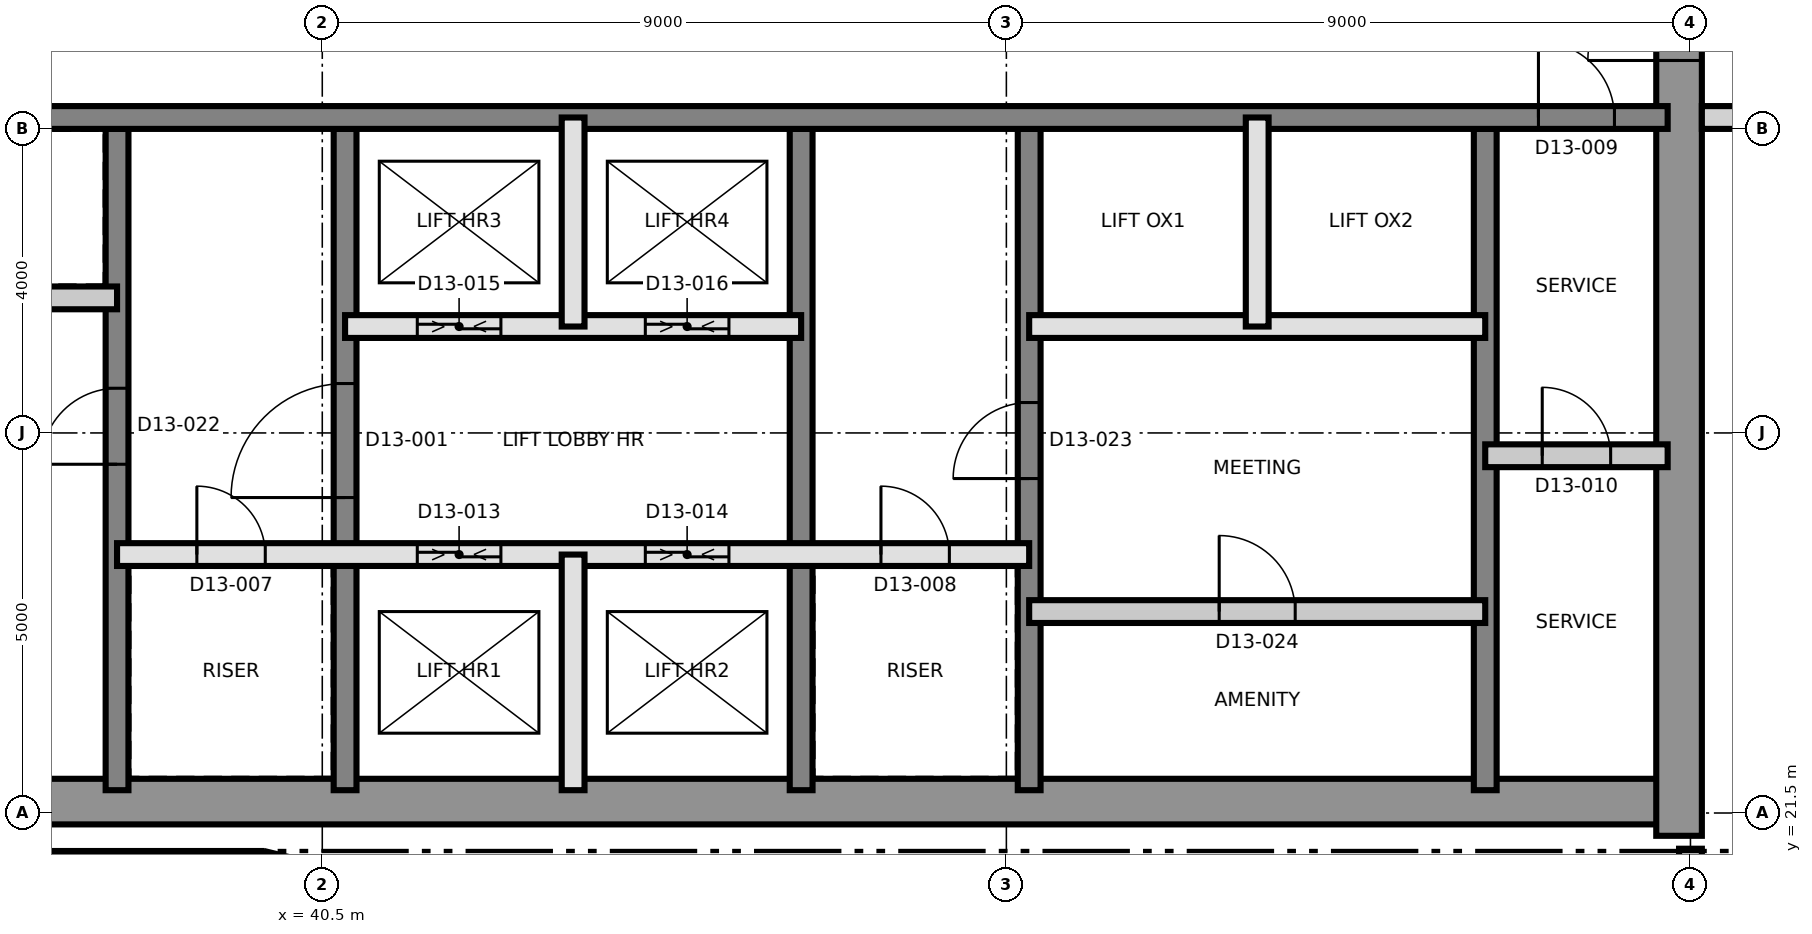
"""IFC4 building model, lengths in metres.
Left out: names, types, materials, properties, quantities, classifications, styles, units other than length and angle.
Written with IfcOpenShell. Run it as: python <this file> out.ifc"""

import sys

from ifc_helpers import new_model, si_unit, direction, frame, frame_2d, origin, place, context, subcontext, project, spatial, rectangle, extrude, element, fill, save


model = new_model("IFC4")
c1 = context("Model", 3, precision=1e-05, world=origin(), true_north=direction((0.0, 1.0)))
c2 = subcontext(c1, "Body", "Model", "MODEL_VIEW")
j1 = project(units=[si_unit("LENGTHUNIT", "METRE"), si_unit("PLANEANGLEUNIT", "RADIAN")], contexts=[c1])
p1 = place(None, origin())
s1 = spatial("IfcSite", under=j1, at=p1, CompositionType="ELEMENT")
p2 = place(p1, origin())
s2 = spatial("IfcBuilding", under=s1, at=p2, CompositionType="ELEMENT")
p3 = place(p2, frame((0.0, 0.0, 145.9)))
s3 = spatial("IfcBuildingStorey", under=s2, at=p3, CompositionType="ELEMENT", Elevation=145.9)
p4 = place(p3, frame((31.2, 21.65, 0.0), z_axis=(0.0, 0.0, 1.0), x_axis=(1.0, 0.0, 0.0)))
e1 = element("IfcWall", 1, at=p4, inside=s3, PredefinedType="SHEAR", context=c2, shape_type="SweptSolid", body=[
    extrude(rectangle(XDim=27.0, YDim=0.6, at=frame_2d((13.5, 0.0))), origin(), (0.0, 0.0, 1.0), 3.7),
])
p5 = place(p3, frame((58.35, 21.2, 0.0), z_axis=(0.0, 0.0, 1.0), x_axis=(0.0, 1.0, 0.0)))
e2 = element("IfcWall", 2, at=p5, inside=s3, PredefinedType="SHEAR", context=c2, shape_type="SweptSolid", body=[
    extrude(rectangle(XDim=18.6, YDim=0.6, at=frame_2d((9.3, 0.0))), origin(), (0.0, 0.0, 1.0), 3.7),
])
p6 = place(p5, frame((10.2, 0.0, 0.0)))
e3 = element("IfcOpeningElement", 3, at=p6, cuts=e2, PredefinedType="OPENING", context=c2, shape_type="SweptSolid", body=[
    extrude(rectangle(XDim=1.2, YDim=2.1, at=frame_2d((0.6, 1.05))), frame((0.0, 0.31, 0.0), z_axis=(0.0, -1.0, 0.0), x_axis=(1.0, 0.0, 0.0)), (0.0, 0.0, 1.0), 0.62),
])
p7 = place(p3, frame((37.8, 21.8, 0.0), z_axis=(0.0, 0.0, 1.0), x_axis=(0.0, 1.0, 0.0)))
e4 = element("IfcWall", 4, at=p7, inside=s3, PredefinedType="SHEAR", context=c2, shape_type="SweptSolid", body=[
    extrude(rectangle(XDim=8.7, YDim=0.3, at=frame_2d((4.35, 0.0))), origin(), (0.0, 0.0, 1.0), 3.7),
])
p8 = place(p7, frame((4.288, 0.0, 0.0)))
e5 = element("IfcOpeningElement", 5, at=p8, cuts=e4, PredefinedType="OPENING", context=c2, shape_type="SweptSolid", body=[
    extrude(rectangle(XDim=1.0, YDim=2.1, at=frame_2d((0.5, 1.05))), frame((0.0, 0.16, 0.0), z_axis=(0.0, -1.0, 0.0), x_axis=(1.0, 0.0, 0.0)), (0.0, 0.0, 1.0), 0.32),
])
p9 = place(p3, frame((40.8, 21.8, 0.0), z_axis=(0.0, 0.0, 1.0), x_axis=(0.0, 1.0, 0.0)))
e6 = element("IfcWall", 6, at=p9, inside=s3, PredefinedType="SHEAR", context=c2, shape_type="SweptSolid", body=[
    extrude(rectangle(XDim=8.7, YDim=0.3, at=frame_2d((4.35, 0.0))), origin(), (0.0, 0.0, 1.0), 3.7),
])
p10 = place(p9, frame((3.85, 0.0, 0.0)))
e7 = element("IfcOpeningElement", 7, at=p10, cuts=e6, PredefinedType="OPENING", context=c2, shape_type="SweptSolid", body=[
    extrude(rectangle(XDim=1.5, YDim=2.1, at=frame_2d((0.75, 1.05))), frame((0.0, 0.16, 0.0), z_axis=(0.0, -1.0, 0.0), x_axis=(1.0, 0.0, 0.0)), (0.0, 0.0, 1.0), 0.32),
])
p11 = place(p3, frame((46.8, 21.8, 0.0), z_axis=(0.0, 0.0, 1.0), x_axis=(0.0, 1.0, 0.0)))
e8 = element("IfcWall", 8, at=p11, inside=s3, PredefinedType="SHEAR", context=c2, shape_type="SweptSolid", body=[
    extrude(rectangle(XDim=8.7, YDim=0.3, at=frame_2d((4.35, 0.0))), origin(), (0.0, 0.0, 1.0), 3.7),
])
p12 = place(p3, frame((49.8, 21.8, 0.0), z_axis=(0.0, 0.0, 1.0), x_axis=(0.0, 1.0, 0.0)))
e9 = element("IfcWall", 9, at=p12, inside=s3, PredefinedType="SHEAR", context=c2, shape_type="SweptSolid", body=[
    extrude(rectangle(XDim=8.7, YDim=0.3, at=frame_2d((4.35, 0.0))), origin(), (0.0, 0.0, 1.0), 3.7),
])
p13 = place(p12, frame((4.1, 0.0, 0.0)))
e10 = element("IfcOpeningElement", 10, at=p13, cuts=e9, PredefinedType="OPENING", context=c2, shape_type="SweptSolid", body=[
    extrude(rectangle(XDim=1.0, YDim=2.1, at=frame_2d((0.5, 1.05))), frame((0.0, 0.16, 0.0), z_axis=(0.0, -1.0, 0.0), x_axis=(1.0, 0.0, 0.0)), (0.0, 0.0, 1.0), 0.32),
])
p14 = place(p3, frame((55.8, 21.8, 0.0), z_axis=(0.0, 0.0, 1.0), x_axis=(0.0, 1.0, 0.0)))
e11 = element("IfcWall", 11, at=p14, inside=s3, PredefinedType="SHEAR", context=c2, shape_type="SweptSolid", body=[
    extrude(rectangle(XDim=8.7, YDim=0.3, at=frame_2d((4.35, 0.0))), origin(), (0.0, 0.0, 1.0), 3.7),
])
p15 = place(p3, frame((31.8, 30.65, 0.0), z_axis=(0.0, 0.0, 1.0), x_axis=(1.0, 0.0, 0.0)))
e12 = element("IfcWall", 12, at=p15, inside=s3, PredefinedType="SHEAR", context=c2, shape_type="SweptSolid", body=[
    extrude(rectangle(XDim=26.4, YDim=0.3, at=frame_2d((13.2, 0.0))), origin(), (0.0, 0.0, 1.0), 3.7),
])
p16 = place(p15, frame((24.7, 0.0, 0.0)))
e13 = element("IfcOpeningElement", 13, at=p16, cuts=e12, PredefinedType="OPENING", context=c2, shape_type="SweptSolid", body=[
    extrude(rectangle(XDim=1.0, YDim=2.1, at=frame_2d((0.5, 1.05))), frame((0.0, 0.16, 0.0), z_axis=(0.0, -1.0, 0.0), x_axis=(1.0, 0.0, 0.0)), (0.0, 0.0, 1.0), 0.32),
])
p17 = place(p15, frame((4.0, 0.0, 0.0)))
e14 = element("IfcOpeningElement", 14, at=p17, cuts=e12, PredefinedType="OPENING", context=c2, shape_type="SweptSolid", body=[
    extrude(rectangle(XDim=1.0, YDim=2.1, at=frame_2d((0.5, 1.05))), frame((0.0, 0.16, 0.0), z_axis=(0.0, -1.0, 0.0), x_axis=(1.0, 0.0, 0.0)), (0.0, 0.0, 1.0), 0.32),
])
p18 = place(p3, frame((31.36, 20.85, 0.0), z_axis=(0.0, 0.0, 1.0), x_axis=(1.0, 0.0, 0.0)))
e15 = element("IfcWall", 15, at=p18, inside=s3, PredefinedType="SOLIDWALL", context=c2, shape_type="SweptSolid", body=[
    extrude(rectangle(XDim=8.34, YDim=0.3, at=frame_2d((4.17, 0.0))), origin(), (0.0, 0.0, 1.0), 3.4),
])
p19 = place(p3, frame((39.735, 20.846, 0.0), z_axis=(0.0, 0.0, 1.0), x_axis=(0.97206095595, -0.234728562212, 0.0)))
e16 = element("IfcWall", 16, at=p19, inside=s3, PredefinedType="SOLIDWALL", context=c2, shape_type="SweptSolid", body=[
    extrude(rectangle(XDim=2.35, YDim=0.3, at=frame_2d((1.175, 0.0))), origin(), (0.0, 0.0, 1.0), 3.4),
])
p20 = place(p3, frame((49.8, 24.15, 0.0), z_axis=(0.0, 0.0, 1.0), x_axis=(1.0, 0.0, 0.0)))
e17 = element("IfcWall", 17, at=p20, inside=s3, PredefinedType="PARTITIONING", context=c2, shape_type="SweptSolid", body=[
    extrude(rectangle(XDim=6.0, YDim=0.3, at=frame_2d((3.0, 0.0))), origin(), (0.0, 0.0, 1.0), 3.4),
])
p21 = place(p20, frame((2.5, 0.0, 0.0)))
e18 = element("IfcOpeningElement", 18, at=p21, cuts=e17, PredefinedType="OPENING", context=c2, shape_type="SweptSolid", body=[
    extrude(rectangle(XDim=1.0, YDim=2.1, at=frame_2d((0.5, 1.05))), frame((0.0, 0.16, 0.0), z_axis=(0.0, -1.0, 0.0), x_axis=(1.0, 0.0, 0.0)), (0.0, 0.0, 1.0), 0.32),
])
p22 = place(p3, frame((37.8, 24.9, 0.0), z_axis=(0.0, 0.0, 1.0), x_axis=(1.0, 0.0, 0.0)))
e19 = element("IfcWall", 19, at=p22, inside=s3, PredefinedType="SOLIDWALL", context=c2, shape_type="SweptSolid", body=[
    extrude(rectangle(XDim=12.0, YDim=0.3, at=frame_2d((6.0, 0.0))), origin(), (0.0, 0.0, 1.0), 3.4),
])
p23 = place(p22, frame((1.05, 0.0, 0.0)))
e20 = element("IfcOpeningElement", 20, at=p23, cuts=e19, PredefinedType="OPENING", context=c2, shape_type="SweptSolid", body=[
    extrude(rectangle(XDim=0.9, YDim=2.1, at=frame_2d((0.45, 1.05))), frame((0.0, 0.16, 0.0), z_axis=(0.0, -1.0, 0.0), x_axis=(1.0, 0.0, 0.0)), (0.0, 0.0, 1.0), 0.32),
])
p24 = place(p22, frame((10.05, 0.0, 0.0)))
e21 = element("IfcOpeningElement", 21, at=p24, cuts=e19, PredefinedType="OPENING", context=c2, shape_type="SweptSolid", body=[
    extrude(rectangle(XDim=0.9, YDim=2.1, at=frame_2d((0.45, 1.05))), frame((0.0, 0.16, 0.0), z_axis=(0.0, -1.0, 0.0), x_axis=(1.0, 0.0, 0.0)), (0.0, 0.0, 1.0), 0.32),
])
p25 = place(p22, frame((3.95, 0.0, 0.0)))
e22 = element("IfcOpeningElement", 22, at=p25, cuts=e19, PredefinedType="OPENING", context=c2, shape_type="SweptSolid", body=[
    extrude(rectangle(XDim=1.1, YDim=2.4, at=frame_2d((0.55, 1.2))), frame((0.0, 0.16, 0.0), z_axis=(0.0, -1.0, 0.0), x_axis=(1.0, 0.0, 0.0)), (0.0, 0.0, 1.0), 0.32),
])
p26 = place(p22, frame((6.95, 0.0, 0.0)))
e23 = element("IfcOpeningElement", 23, at=p26, cuts=e19, PredefinedType="OPENING", context=c2, shape_type="SweptSolid", body=[
    extrude(rectangle(XDim=1.1, YDim=2.4, at=frame_2d((0.55, 1.2))), frame((0.0, 0.16, 0.0), z_axis=(0.0, -1.0, 0.0), x_axis=(1.0, 0.0, 0.0)), (0.0, 0.0, 1.0), 0.32),
])
p27 = place(p3, frame((55.8, 26.2, 0.0), z_axis=(0.0, 0.0, 1.0), x_axis=(1.0, 0.0, 0.0)))
e24 = element("IfcWall", 24, at=p27, inside=s3, PredefinedType="PARTITIONING", context=c2, shape_type="SweptSolid", body=[
    extrude(rectangle(XDim=2.4, YDim=0.3, at=frame_2d((1.2, 0.0))), origin(), (0.0, 0.0, 1.0), 3.4),
])
p28 = place(p27, frame((0.75, 0.0, 0.0)))
e25 = element("IfcOpeningElement", 25, at=p28, cuts=e24, PredefinedType="OPENING", context=c2, shape_type="SweptSolid", body=[
    extrude(rectangle(XDim=0.9, YDim=2.1, at=frame_2d((0.45, 1.05))), frame((0.0, 0.16, 0.0), z_axis=(0.0, -1.0, 0.0), x_axis=(1.0, 0.0, 0.0)), (0.0, 0.0, 1.0), 0.32),
])
p29 = place(p3, frame((40.8, 27.9, 0.0), z_axis=(0.0, 0.0, 1.0), x_axis=(1.0, 0.0, 0.0)))
e26 = element("IfcWall", 26, at=p29, inside=s3, PredefinedType="SOLIDWALL", context=c2, shape_type="SweptSolid", body=[
    extrude(rectangle(XDim=6.0, YDim=0.3, at=frame_2d((3.0, 0.0))), origin(), (0.0, 0.0, 1.0), 3.4),
])
p30 = place(p29, frame((0.95, 0.0, 0.0)))
e27 = element("IfcOpeningElement", 27, at=p30, cuts=e26, PredefinedType="OPENING", context=c2, shape_type="SweptSolid", body=[
    extrude(rectangle(XDim=1.1, YDim=2.4, at=frame_2d((0.55, 1.2))), frame((0.0, 0.16, 0.0), z_axis=(0.0, -1.0, 0.0), x_axis=(1.0, 0.0, 0.0)), (0.0, 0.0, 1.0), 0.32),
])
p31 = place(p29, frame((3.95, 0.0, 0.0)))
e28 = element("IfcOpeningElement", 28, at=p31, cuts=e26, PredefinedType="OPENING", context=c2, shape_type="SweptSolid", body=[
    extrude(rectangle(XDim=1.1, YDim=2.4, at=frame_2d((0.55, 1.2))), frame((0.0, 0.16, 0.0), z_axis=(0.0, -1.0, 0.0), x_axis=(1.0, 0.0, 0.0)), (0.0, 0.0, 1.0), 0.32),
])
p32 = place(p3, frame((49.8, 27.9, 0.0), z_axis=(0.0, 0.0, 1.0), x_axis=(1.0, 0.0, 0.0)))
e29 = element("IfcWall", 29, at=p32, inside=s3, PredefinedType="SOLIDWALL", context=c2, shape_type="SweptSolid", body=[
    extrude(rectangle(XDim=6.0, YDim=0.3, at=frame_2d((3.0, 0.0))), origin(), (0.0, 0.0, 1.0), 3.4),
])
p33 = place(p3, frame((31.8, 28.277, 0.0), z_axis=(0.0, 0.0, 1.0), x_axis=(1.0, 0.0, 0.0)))
e30 = element("IfcWall", 30, at=p33, inside=s3, PredefinedType="PARTITIONING", context=c2, shape_type="SweptSolid", body=[
    extrude(rectangle(XDim=6.0, YDim=0.3, at=frame_2d((3.0, 0.0))), origin(), (0.0, 0.0, 1.0), 3.4),
])
p34 = place(p3, frame((43.8, 21.8, 0.0), z_axis=(0.0, 0.0, 1.0), x_axis=(0.0, 1.0, 0.0)))
e31 = element("IfcWall", 31, at=p34, inside=s3, PredefinedType="SOLIDWALL", context=c2, shape_type="SweptSolid", body=[
    extrude(rectangle(XDim=3.1, YDim=0.3, at=frame_2d((1.55, 0.0))), origin(), (0.0, 0.0, 1.0), 3.4),
])
for number, where, z_axis, x_axis in (
    (32, (43.8, 27.9, 0.0), (0.0, 0.0, 1.0), (0.0, 1.0, 0.0)),
    (33, (52.8, 27.9, 0.0), (0.0, 0.0, 1.0), (0.0, 1.0, 0.0)),
):
    element("IfcWall", number, at=place(p3, frame(where, z_axis=z_axis, x_axis=x_axis)), inside=s3, PredefinedType="SOLIDWALL", context=c2, shape_type="SweptSolid", body=[
        extrude(rectangle(XDim=2.75, YDim=0.3, at=frame_2d((1.375, 0.0))), origin(), (0.0, 0.0, 1.0), 3.4),
    ])
p35 = place(p3, frame((58.65, 30.65, 0.0), z_axis=(0.0, 0.0, 1.0), x_axis=(1.0, 0.0, 0.0)))
e34 = element("IfcWall", 34, at=p35, inside=s3, PredefinedType="PARTITIONING", context=c2, shape_type="SweptSolid", body=[
    extrude(rectangle(XDim=26.68, YDim=0.3, at=frame_2d((13.34, 0.0))), origin(), (0.0, 0.0, 1.0), 3.3),
])
p36 = place(p35, frame((2.2, 0.0, 0.0)))
e35 = element("IfcOpeningElement", 35, at=p36, cuts=e34, PredefinedType="OPENING", context=c2, shape_type="SweptSolid", body=[
    extrude(rectangle(XDim=1.0, YDim=2.4, at=frame_2d((0.5, 1.2))), frame((0.0, 0.16, 0.0), z_axis=(0.0, -1.0, 0.0), x_axis=(1.0, 0.0, 0.0)), (0.0, 0.0, 1.0), 0.32),
])
p37 = place(p35, frame((12.85, 0.0, 0.0)))
e36 = element("IfcOpeningElement", 36, at=p37, cuts=e34, PredefinedType="OPENING", context=c2, shape_type="SweptSolid", body=[
    extrude(rectangle(XDim=1.0, YDim=2.4, at=frame_2d((0.5, 1.2))), frame((0.0, 0.16, 0.0), z_axis=(0.0, -1.0, 0.0), x_axis=(1.0, 0.0, 0.0)), (0.0, 0.0, 1.0), 0.32),
])
p38 = place(p35, frame((20.77, 0.0, 0.0)))
e37 = element("IfcOpeningElement", 37, at=p38, cuts=e34, PredefinedType="OPENING", context=c2, shape_type="SweptSolid", body=[
    extrude(rectangle(XDim=1.0, YDim=2.1, at=frame_2d((0.5, 1.05))), frame((0.0, 0.16, 0.0), z_axis=(0.0, -1.0, 0.0), x_axis=(1.0, 0.0, 0.0)), (0.0, 0.0, 1.0), 0.32),
])
p39 = place(p35, frame((22.57, 0.0, 0.0)))
e38 = element("IfcOpeningElement", 38, at=p39, cuts=e34, PredefinedType="OPENING", context=c2, shape_type="SweptSolid", body=[
    extrude(rectangle(XDim=1.0, YDim=2.1, at=frame_2d((0.5, 1.05))), frame((0.0, 0.16, 0.0), z_axis=(0.0, -1.0, 0.0), x_axis=(1.0, 0.0, 0.0)), (0.0, 0.0, 1.0), 0.32),
])
p40 = place(p3, frame((58.5, 20.35, 0.0), z_axis=(0.0, 0.0, 1.0), x_axis=(0.0, 1.0, 0.0)))
e39 = element("IfcWall", 39, at=p40, inside=s3, PredefinedType="PARTITIONING", context=c2, shape_type="SweptSolid", body=[
    extrude(rectangle(XDim=0.68, YDim=0.3, at=frame_2d((0.34, 0.0))), origin(), (0.0, 0.0, 1.0), 3.4),
])
p41 = place(p10, origin())
e40 = element("IfcDoor", 40, at=p41, inside=s3, OperationType="SINGLE_SWING_RIGHT", PredefinedType="DOOR", context=c2, shape_type="SweptSolid", body=[
    extrude(rectangle(XDim=1.5, YDim=2.1, at=frame_2d((0.75, 1.05))), frame((0.0, 0.025, 0.0), z_axis=(0.0, -1.0, 0.0), x_axis=(1.0, 0.0, 0.0)), (0.0, 0.0, 1.0), 0.05),
])
fill(e7, e40)
p42 = place(p23, origin())
e41 = element("IfcDoor", 41, at=p42, inside=s3, OperationType="SINGLE_SWING_LEFT", PredefinedType="DOOR", context=c2, shape_type="SweptSolid", body=[
    extrude(rectangle(XDim=0.9, YDim=2.1, at=frame_2d((0.45, 1.05))), frame((0.0, 0.025, 0.0), z_axis=(0.0, -1.0, 0.0), x_axis=(1.0, 0.0, 0.0)), (0.0, 0.0, 1.0), 0.05),
])
fill(e20, e41)
p43 = place(p24, origin())
e42 = element("IfcDoor", 42, at=p43, inside=s3, OperationType="SINGLE_SWING_RIGHT", PredefinedType="DOOR", context=c2, shape_type="SweptSolid", body=[
    extrude(rectangle(XDim=0.9, YDim=2.1, at=frame_2d((0.45, 1.05))), frame((0.0, 0.025, 0.0), z_axis=(0.0, -1.0, 0.0), x_axis=(1.0, 0.0, 0.0)), (0.0, 0.0, 1.0), 0.05),
])
fill(e21, e42)
p44 = place(p16, origin())
e43 = element("IfcDoor", 43, at=p44, inside=s3, OperationType="SINGLE_SWING_LEFT", PredefinedType="DOOR", context=c2, shape_type="SweptSolid", body=[
    extrude(rectangle(XDim=1.0, YDim=2.1, at=frame_2d((0.5, 1.05))), frame((0.0, 0.025, 0.0), z_axis=(0.0, -1.0, 0.0), x_axis=(1.0, 0.0, 0.0)), (0.0, 0.0, 1.0), 0.05),
])
fill(e13, e43)
p45 = place(p28, origin())
e44 = element("IfcDoor", 44, at=p45, inside=s3, OperationType="SINGLE_SWING_RIGHT", PredefinedType="DOOR", context=c2, shape_type="SweptSolid", body=[
    extrude(rectangle(XDim=0.9, YDim=2.1, at=frame_2d((0.45, 1.05))), frame((0.0, 0.025, 0.0), z_axis=(0.0, -1.0, 0.0), x_axis=(1.0, 0.0, 0.0)), (0.0, 0.0, 1.0), 0.05),
])
fill(e25, e44)
p46 = place(p6, origin())
e45 = element("IfcDoor", 45, at=p46, inside=s3, OperationType="SINGLE_SWING_LEFT", PredefinedType="DOOR", context=c2, shape_type="SweptSolid", body=[
    extrude(rectangle(XDim=1.2, YDim=2.1, at=frame_2d((0.6, 1.05))), frame((0.0, 0.025, 0.0), z_axis=(0.0, -1.0, 0.0), x_axis=(1.0, 0.0, 0.0)), (0.0, 0.0, 1.0), 0.05),
])
fill(e3, e45)
p47 = place(p25, origin())
e46 = element("IfcDoor", 46, at=p47, inside=s3, OperationType="SLIDING_TO_LEFT", PredefinedType="DOOR", context=c2, shape_type="SweptSolid", body=[
    extrude(rectangle(XDim=1.1, YDim=2.4, at=frame_2d((0.55, 1.2))), frame((0.0, 0.025, 0.0), z_axis=(0.0, -1.0, 0.0), x_axis=(1.0, 0.0, 0.0)), (0.0, 0.0, 1.0), 0.05),
])
fill(e22, e46)
p48 = place(p26, origin())
e47 = element("IfcDoor", 47, at=p48, inside=s3, OperationType="SLIDING_TO_LEFT", PredefinedType="DOOR", context=c2, shape_type="SweptSolid", body=[
    extrude(rectangle(XDim=1.1, YDim=2.4, at=frame_2d((0.55, 1.2))), frame((0.0, 0.025, 0.0), z_axis=(0.0, -1.0, 0.0), x_axis=(1.0, 0.0, 0.0)), (0.0, 0.0, 1.0), 0.05),
])
fill(e23, e47)
p49 = place(p30, origin())
e48 = element("IfcDoor", 48, at=p49, inside=s3, OperationType="SLIDING_TO_LEFT", PredefinedType="DOOR", context=c2, shape_type="SweptSolid", body=[
    extrude(rectangle(XDim=1.1, YDim=2.4, at=frame_2d((0.55, 1.2))), frame((0.0, 0.025, 0.0), z_axis=(0.0, -1.0, 0.0), x_axis=(1.0, 0.0, 0.0)), (0.0, 0.0, 1.0), 0.05),
])
fill(e27, e48)
p50 = place(p31, origin())
e49 = element("IfcDoor", 49, at=p50, inside=s3, OperationType="SLIDING_TO_LEFT", PredefinedType="DOOR", context=c2, shape_type="SweptSolid", body=[
    extrude(rectangle(XDim=1.1, YDim=2.4, at=frame_2d((0.55, 1.2))), frame((0.0, 0.025, 0.0), z_axis=(0.0, -1.0, 0.0), x_axis=(1.0, 0.0, 0.0)), (0.0, 0.0, 1.0), 0.05),
])
fill(e28, e49)
p51 = place(p8, origin())
e50 = element("IfcDoor", 50, at=p51, inside=s3, OperationType="SINGLE_SWING_RIGHT", PredefinedType="DOOR", context=c2, shape_type="SweptSolid", body=[
    extrude(rectangle(XDim=1.0, YDim=2.1, at=frame_2d((0.5, 1.05))), frame((0.0, 0.025, 0.0), z_axis=(0.0, -1.0, 0.0), x_axis=(1.0, 0.0, 0.0)), (0.0, 0.0, 1.0), 0.05),
])
fill(e5, e50)
p52 = place(p13, origin())
e51 = element("IfcDoor", 51, at=p52, inside=s3, OperationType="SINGLE_SWING_LEFT", PredefinedType="DOOR", context=c2, shape_type="SweptSolid", body=[
    extrude(rectangle(XDim=1.0, YDim=2.1, at=frame_2d((0.5, 1.05))), frame((0.0, 0.025, 0.0), z_axis=(0.0, -1.0, 0.0), x_axis=(1.0, 0.0, 0.0)), (0.0, 0.0, 1.0), 0.05),
])
fill(e10, e51)
p53 = place(p21, origin())
e52 = element("IfcDoor", 52, at=p53, inside=s3, OperationType="SINGLE_SWING_RIGHT", PredefinedType="DOOR", context=c2, shape_type="SweptSolid", body=[
    extrude(rectangle(XDim=1.0, YDim=2.1, at=frame_2d((0.5, 1.05))), frame((0.0, 0.025, 0.0), z_axis=(0.0, -1.0, 0.0), x_axis=(1.0, 0.0, 0.0)), (0.0, 0.0, 1.0), 0.05),
])
fill(e18, e52)
save(model, sys.argv[1])
